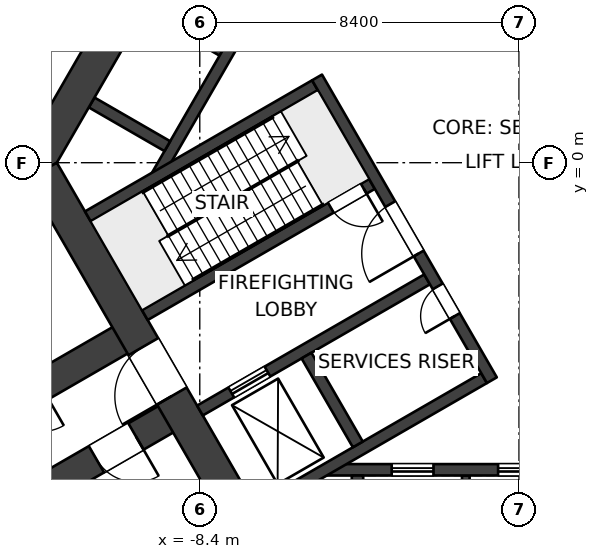
"""IFC4 building model, lengths in metres.
Left out: names, types, materials, properties, quantities, classifications, styles, units other than length and angle.
Written with IfcOpenShell. Run it as: python <this file> out.ifc"""

import sys

from ifc_helpers import new_model, si_unit, direction, frame, frame_2d, origin, place, context, subcontext, project, spatial, polyline, rectangle, outline, extrude, element, fill, save


model = new_model("IFC4")
c1 = context("Model", 3, precision=1e-05, world=origin(), true_north=direction((0.0, 1.0)))
c2 = subcontext(c1, "Body", "Model", "MODEL_VIEW")
j1 = project(units=[si_unit("LENGTHUNIT", "METRE"), si_unit("PLANEANGLEUNIT", "RADIAN")], contexts=[c1])
p1 = place(None, origin())
s1 = spatial("IfcSite", under=j1, at=p1, CompositionType="ELEMENT")
p2 = place(p1, origin())
s2 = spatial("IfcBuilding", under=s1, at=p2, CompositionType="ELEMENT")
p3 = place(p2, frame((0.0, 0.0, 21.0)))
s3 = spatial("IfcBuildingStorey", under=s2, at=p3, CompositionType="ELEMENT", Elevation=21.0)
p4 = place(p3, frame((-6.47, -10.757, 0.0), z_axis=(0.0, 0.0, 1.0), x_axis=(-0.499997612506, 0.8660267822, 0.0)))
e1 = element("IfcWall", 1, at=p4, inside=s3, PredefinedType="SHEAR", context=c2, shape_type="SweptSolid", body=[
    extrude(rectangle(XDim=12.161, YDim=0.9, at=frame_2d((6.08, 0.0))), origin(), (0.0, 0.0, 1.0), 5.0),
])
p5 = place(p4, frame((5.33, 0.0, 0.0)))
e2 = element("IfcOpeningElement", 2, at=p5, cuts=e1, PredefinedType="OPENING", context=c2, shape_type="SweptSolid", body=[
    extrude(rectangle(XDim=1.5, YDim=2.1, at=frame_2d((0.75, 1.05))), frame((0.0, 0.46, 0.0), z_axis=(0.0, -1.0, 0.0), x_axis=(1.0, 0.0, 0.0)), (0.0, 0.0, 1.0), 0.92),
])
p6 = place(p3, origin())
e3 = element("IfcWall", 3, at=p6, inside=s3, PredefinedType="SHEAR", context=c2, shape_type="SweptSolid", body=[
    extrude(outline(polyline([(-6.6, 11.432), (-13.2, 0.0), (-12.94, -0.45), (-12.161, 0.0), (-6.08, 10.531), (-6.08, 11.432), (-6.6, 11.432)])), origin(), (0.0, 0.0, 1.0), 5.0),
])
p7 = place(p3, frame((-0.714, -5.724, 0.0), z_axis=(0.0, 0.0, 1.0), x_axis=(-0.499995050369, 0.866028261437, 0.0)))
e4 = element("IfcWall", 4, at=p7, inside=s3, PredefinedType="SHEAR", context=c2, shape_type="SweptSolid", body=[
    extrude(rectangle(XDim=9.2, YDim=0.3, at=frame_2d((4.6, 0.0))), origin(), (0.0, 0.0, 1.0), 5.0),
])
p8 = place(p7, frame((3.85, 0.0, 0.0)))
e5 = element("IfcOpeningElement", 5, at=p8, cuts=e4, PredefinedType="OPENING", context=c2, shape_type="SweptSolid", body=[
    extrude(rectangle(XDim=1.5, YDim=2.1, at=frame_2d((0.75, 1.05))), frame((0.0, 0.16, 0.0), z_axis=(0.0, -1.0, 0.0), x_axis=(1.0, 0.0, 0.0)), (0.0, 0.0, 1.0), 0.32),
])
p9 = place(p7, frame((1.95, 0.0, 0.0)))
e6 = element("IfcOpeningElement", 6, at=p9, cuts=e4, PredefinedType="OPENING", context=c2, shape_type="SweptSolid", body=[
    extrude(rectangle(XDim=0.9, YDim=2.1, at=frame_2d((0.45, 1.05))), frame((0.0, 0.16, 0.0), z_axis=(0.0, -1.0, 0.0), x_axis=(1.0, 0.0, 0.0)), (0.0, 0.0, 1.0), 0.32),
])
p10 = place(p3, frame((-3.869, -0.559, 0.0), z_axis=(0.0, 0.0, 1.0), x_axis=(-0.86602711848, -0.499997030048, 0.0)))
e7 = element("IfcWall", 7, at=p10, inside=s3, PredefinedType="SHEAR", context=c2, shape_type="SweptSolid", body=[
    extrude(rectangle(XDim=6.901, YDim=0.3, at=frame_2d((3.451, 0.0))), origin(), (0.0, 0.0, 1.0), 5.0),
])
p11 = place(p10, frame((0.25, 0.0, 0.0)))
e8 = element("IfcOpeningElement", 8, at=p11, cuts=e7, PredefinedType="OPENING", context=c2, shape_type="SweptSolid", body=[
    extrude(rectangle(XDim=1.0, YDim=2.1, at=frame_2d((0.5, 1.05))), frame((0.0, 0.16, 0.0), z_axis=(0.0, -1.0, 0.0), x_axis=(1.0, 0.0, 0.0)), (0.0, 0.0, 1.0), 0.32),
])
p12 = place(p3, frame((-5.369, 2.039, 0.0), z_axis=(0.0, 0.0, 1.0), x_axis=(-0.86602711848, -0.499997030048, 0.0)))
e9 = element("IfcWall", 9, at=p12, inside=s3, PredefinedType="SHEAR", context=c2, shape_type="SweptSolid", body=[
    extrude(rectangle(XDim=6.901, YDim=0.3, at=frame_2d((3.451, 0.0))), origin(), (0.0, 0.0, 1.0), 5.0),
])
p13 = place(p3, frame((-2.419, -3.071, 0.0), z_axis=(0.0, 0.0, 1.0), x_axis=(-0.86602711848, -0.499997030048, 0.0)))
e10 = element("IfcWall", 10, at=p13, inside=s3, PredefinedType="SHEAR", context=c2, shape_type="SweptSolid", body=[
    extrude(rectangle(XDim=6.901, YDim=0.3, at=frame_2d((3.451, 0.0))), origin(), (0.0, 0.0, 1.0), 5.0),
])
p14 = place(p13, frame((4.85, 0.0, 0.0)))
e11 = element("IfcOpeningElement", 11, at=p14, cuts=e10, PredefinedType="OPENING", context=c2, shape_type="SweptSolid", body=[
    extrude(rectangle(XDim=1.1, YDim=2.1, at=frame_2d((0.55, 1.05))), frame((0.0, 0.16, 0.0), z_axis=(0.0, -1.0, 0.0), x_axis=(1.0, 0.0, 0.0)), (0.0, 0.0, 1.0), 0.32),
])
p15 = place(p3, frame((-0.919, -5.669, 0.0), z_axis=(0.0, 0.0, 1.0), x_axis=(-0.866011800373, -0.500023561059, 0.0)))
e12 = element("IfcWall", 12, at=p15, inside=s3, PredefinedType="SHEAR", context=c2, shape_type="SweptSolid", body=[
    extrude(rectangle(XDim=6.902, YDim=0.3, at=frame_2d((3.451, 0.0))), origin(), (0.0, 0.0, 1.0), 5.0),
])
p16 = place(p3, frame((-4.241, -7.414, 0.0), z_axis=(0.0, 0.0, 1.0), x_axis=(-0.500048589285, 0.86599734893, 0.0)))
e13 = element("IfcWall", 13, at=p16, inside=s3, PredefinedType="SHEAR", context=c2, shape_type="SweptSolid", body=[
    extrude(rectangle(XDim=2.7, YDim=0.3, at=frame_2d((1.35, 0.0))), origin(), (0.0, 0.0, 1.0), 5.0),
])
p17 = place(p3, frame((5.098, -8.082, 0.0), z_axis=(0.0, 0.0, 1.0), x_axis=(-1.0, 0.0, 0.0)))
e14 = element("IfcWall", 14, at=p17, inside=s3, PredefinedType="SHEAR", context=c2, shape_type="SweptSolid", body=[
    extrude(rectangle(XDim=10.195, YDim=0.3, at=frame_2d((5.098, 0.0))), origin(), (0.0, 0.0, 1.0), 5.0),
])
p18 = place(p17, frame((1.748, 0.0, 0.0)))
e15 = element("IfcOpeningElement", 15, at=p18, cuts=e14, PredefinedType="OPENING", context=c2, shape_type="SweptSolid", body=[
    extrude(rectangle(XDim=1.1, YDim=2.1, at=frame_2d((0.55, 1.05))), frame((0.0, 0.16, 0.0), z_axis=(0.0, -1.0, 0.0), x_axis=(1.0, 0.0, 0.0)), (0.0, 0.0, 1.0), 0.32),
])
p19 = place(p17, frame((4.548, 0.0, 0.0)))
e16 = element("IfcOpeningElement", 16, at=p19, cuts=e14, PredefinedType="OPENING", context=c2, shape_type="SweptSolid", body=[
    extrude(rectangle(XDim=1.1, YDim=2.1, at=frame_2d((0.55, 1.05))), frame((0.0, 0.16, 0.0), z_axis=(0.0, -1.0, 0.0), x_axis=(1.0, 0.0, 0.0)), (0.0, 0.0, 1.0), 0.32),
])
p20 = place(p17, frame((7.348, 0.0, 0.0)))
e17 = element("IfcOpeningElement", 17, at=p20, cuts=e14, PredefinedType="OPENING", context=c2, shape_type="SweptSolid", body=[
    extrude(rectangle(XDim=1.1, YDim=2.1, at=frame_2d((0.55, 1.05))), frame((0.0, 0.16, 0.0), z_axis=(0.0, -1.0, 0.0), x_axis=(1.0, 0.0, 0.0)), (0.0, 0.0, 1.0), 0.32),
])
p21 = place(p3, frame((-4.25, -8.231, 0.0), z_axis=(0.0, 0.0, 1.0), x_axis=(0.0, -1.0, 0.0)))
e18 = element("IfcWall", 18, at=p21, inside=s3, PredefinedType="SHEAR", context=c2, shape_type="SweptSolid", body=[
    extrude(rectangle(XDim=2.3, YDim=0.3, at=frame_2d((1.15, 0.0))), origin(), (0.0, 0.0, 1.0), 5.0),
])
p22 = place(p3, frame((-1.4, -8.231, 0.0), z_axis=(0.0, 0.0, 1.0), x_axis=(0.0, -1.0, 0.0)))
e19 = element("IfcWall", 19, at=p22, inside=s3, PredefinedType="SHEAR", context=c2, shape_type="SweptSolid", body=[
    extrude(rectangle(XDim=2.3, YDim=0.2, at=frame_2d((1.15, 0.0))), origin(), (0.0, 0.0, 1.0), 5.0),
])
p23 = place(p3, frame((-9.548, -0.374, 0.0), z_axis=(0.0, 0.0, 1.0), x_axis=(0.500002290144, 0.866024081565, 0.0)))
e20 = element("IfcWall", 20, at=p23, inside=s3, PredefinedType="SHEAR", context=c2, shape_type="SweptSolid", body=[
    extrude(rectangle(XDim=10.195, YDim=0.3, at=frame_2d((5.098, 0.0))), origin(), (0.0, 0.0, 1.0), 5.0),
])
p24 = place(p3, frame((-9.254, 0.435, 0.0), z_axis=(0.0, 0.0, 1.0), x_axis=(-0.866007057882, 0.500031774688, 0.0)))
e21 = element("IfcWall", 21, at=p24, inside=s3, PredefinedType="SHEAR", context=c2, shape_type="SweptSolid", body=[
    extrude(rectangle(XDim=2.3, YDim=0.3, at=frame_2d((1.15, 0.0))), origin(), (0.0, 0.0, 1.0), 5.0),
])
p25 = place(p3, frame((-7.829, 2.903, 0.0), z_axis=(0.0, 0.0, 1.0), x_axis=(-0.866053019151, 0.499952165731, 0.0)))
e22 = element("IfcWall", 22, at=p25, inside=s3, PredefinedType="SHEAR", context=c2, shape_type="SweptSolid", body=[
    extrude(rectangle(XDim=2.3, YDim=0.2, at=frame_2d((1.15, 0.0))), origin(), (0.0, 0.0, 1.0), 5.0),
])
p26 = place(p3, frame((-8.91, -6.53, 0.0), z_axis=(0.0, 0.0, 1.0), x_axis=(-0.866026214035, -0.499998596603, 0.0)))
e23 = element("IfcWall", 23, at=p26, inside=s3, PredefinedType="SHEAR", context=c2, shape_type="SweptSolid", body=[
    extrude(rectangle(XDim=36.888, YDim=0.8, at=frame_2d((18.444, 0.0))), origin(), (0.0, 0.0, 1.0), 5.0),
])
p27 = place(p26, frame((1.35, 0.0, 0.0)))
e24 = element("IfcOpeningElement", 24, at=p27, cuts=e23, PredefinedType="OPENING", context=c2, shape_type="SweptSolid", body=[
    extrude(rectangle(XDim=1.2, YDim=2.1, at=frame_2d((0.6, 1.05))), frame((0.0, 0.41, 0.0), z_axis=(0.0, -1.0, 0.0), x_axis=(1.0, 0.0, 0.0)), (0.0, 0.0, 1.0), 0.82),
])
p28 = place(p3, frame((-10.11, -4.451, 0.0), z_axis=(0.0, 0.0, 1.0), x_axis=(-0.866023348156, -0.500003560437, 0.0)))
e25 = element("IfcWall", 25, at=p28, inside=s3, PredefinedType="SHEAR", context=c2, shape_type="SweptSolid", body=[
    extrude(rectangle(XDim=36.888, YDim=0.8, at=frame_2d((18.444, 0.0))), origin(), (0.0, 0.0, 1.0), 5.0),
])
p29 = place(p28, frame((10.0, 0.0, 0.0)))
e26 = element("IfcOpeningElement", 26, at=p29, cuts=e25, PredefinedType="OPENING", context=c2, shape_type="SweptSolid", body=[
    extrude(rectangle(XDim=1.0, YDim=2.1, at=frame_2d((0.5, 1.05))), frame((0.0, 0.41, 0.0), z_axis=(0.0, -1.0, 0.0), x_axis=(1.0, 0.0, 0.0)), (0.0, 0.0, 1.0), 0.82),
])
p30 = place(p28, frame((2.85, 0.0, 0.0)))
e27 = element("IfcOpeningElement", 27, at=p30, cuts=e25, PredefinedType="OPENING", context=c2, shape_type="SweptSolid", body=[
    extrude(rectangle(XDim=1.2, YDim=2.1, at=frame_2d((0.6, 1.05))), frame((0.0, 0.41, 0.0), z_axis=(0.0, -1.0, 0.0), x_axis=(1.0, 0.0, 0.0)), (0.0, 0.0, 1.0), 0.82),
])
p31 = place(p3, frame((-9.45, 6.495, 0.0), z_axis=(0.0, 0.0, 1.0), x_axis=(-0.866027750123, -0.499995936, 0.0)))
e28 = element("IfcWall", 28, at=p31, inside=s3, PredefinedType="SOLIDWALL", context=c2, shape_type="SweptSolid", body=[
    extrude(rectangle(XDim=29.39, YDim=0.3, at=frame_2d((14.695, 0.0))), origin(), (0.0, 0.0, 1.0), 4.6),
])
p32 = place(p31, frame((18.195, 0.0, 0.0)))
e29 = element("IfcOpeningElement", 29, at=p32, cuts=e28, PredefinedType="OPENING", context=c2, shape_type="SweptSolid", body=[
    extrude(rectangle(XDim=1.8, YDim=2.4, at=frame_2d((0.9, 1.2))), frame((0.0, 0.16, 0.0), z_axis=(0.0, -1.0, 0.0), x_axis=(1.0, 0.0, 0.0)), (0.0, 0.0, 1.0), 0.32),
])
p33 = place(p19, origin())
e30 = element("IfcDoor", 30, at=p33, inside=s3, OperationType="DOUBLE_DOOR_SLIDING", PredefinedType="DOOR", context=c2, shape_type="SweptSolid", body=[
    extrude(rectangle(XDim=1.1, YDim=2.1, at=frame_2d((0.55, 1.05))), frame((0.0, 0.025, 0.0), z_axis=(0.0, -1.0, 0.0), x_axis=(1.0, 0.0, 0.0)), (0.0, 0.0, 1.0), 0.05),
])
fill(e16, e30)
p34 = place(p20, origin())
e31 = element("IfcDoor", 31, at=p34, inside=s3, OperationType="DOUBLE_DOOR_SLIDING", PredefinedType="DOOR", context=c2, shape_type="SweptSolid", body=[
    extrude(rectangle(XDim=1.1, YDim=2.1, at=frame_2d((0.55, 1.05))), frame((0.0, 0.025, 0.0), z_axis=(0.0, -1.0, 0.0), x_axis=(1.0, 0.0, 0.0)), (0.0, 0.0, 1.0), 0.05),
])
fill(e17, e31)
p35 = place(p14, origin())
e32 = element("IfcDoor", 32, at=p35, inside=s3, OperationType="DOUBLE_DOOR_SLIDING", PredefinedType="DOOR", context=c2, shape_type="SweptSolid", body=[
    extrude(rectangle(XDim=1.1, YDim=2.1, at=frame_2d((0.55, 1.05))), frame((0.0, 0.025, 0.0), z_axis=(0.0, -1.0, 0.0), x_axis=(1.0, 0.0, 0.0)), (0.0, 0.0, 1.0), 0.05),
])
fill(e11, e32)
p36 = place(p8, origin())
e33 = element("IfcDoor", 33, at=p36, inside=s3, OperationType="DOUBLE_DOOR_DOUBLE_SWING", PredefinedType="DOOR", context=c2, shape_type="SweptSolid", body=[
    extrude(rectangle(XDim=1.5, YDim=2.1, at=frame_2d((0.75, 1.05))), frame((0.0, 0.025, 0.0), z_axis=(0.0, -1.0, 0.0), x_axis=(1.0, 0.0, 0.0)), (0.0, 0.0, 1.0), 0.05),
])
fill(e5, e33)
p37 = place(p9, origin())
e34 = element("IfcDoor", 34, at=p37, inside=s3, OperationType="SINGLE_SWING_LEFT", PredefinedType="DOOR", context=c2, shape_type="SweptSolid", body=[
    extrude(rectangle(XDim=0.9, YDim=2.1, at=frame_2d((0.45, 1.05))), frame((0.0, 0.025, 0.0), z_axis=(0.0, -1.0, 0.0), x_axis=(1.0, 0.0, 0.0)), (0.0, 0.0, 1.0), 0.05),
])
fill(e6, e34)
p38 = place(p11, origin())
e35 = element("IfcDoor", 35, at=p38, inside=s3, OperationType="SINGLE_SWING_LEFT", PredefinedType="DOOR", context=c2, shape_type="SweptSolid", body=[
    extrude(rectangle(XDim=1.0, YDim=2.1, at=frame_2d((0.5, 1.05))), frame((0.0, 0.025, 0.0), z_axis=(0.0, -1.0, 0.0), x_axis=(1.0, 0.0, 0.0)), (0.0, 0.0, 1.0), 0.05),
])
fill(e8, e35)
p39 = place(p5, origin())
e36 = element("IfcDoor", 36, at=p39, inside=s3, OperationType="DOUBLE_DOOR_DOUBLE_SWING", PredefinedType="DOOR", context=c2, shape_type="SweptSolid", body=[
    extrude(rectangle(XDim=1.5, YDim=2.1, at=frame_2d((0.75, 1.05))), frame((0.0, 0.025, 0.0), z_axis=(0.0, -1.0, 0.0), x_axis=(1.0, 0.0, 0.0)), (0.0, 0.0, 1.0), 0.05),
])
fill(e2, e36)
p40 = place(p27, origin())
e37 = element("IfcDoor", 37, at=p40, inside=s3, OperationType="DOUBLE_SWING_LEFT", PredefinedType="DOOR", context=c2, shape_type="SweptSolid", body=[
    extrude(rectangle(XDim=1.2, YDim=2.1, at=frame_2d((0.6, 1.05))), frame((0.0, 0.025, 0.0), z_axis=(0.0, -1.0, 0.0), x_axis=(1.0, 0.0, 0.0)), (0.0, 0.0, 1.0), 0.05),
])
fill(e24, e37)
save(model, sys.argv[1])
